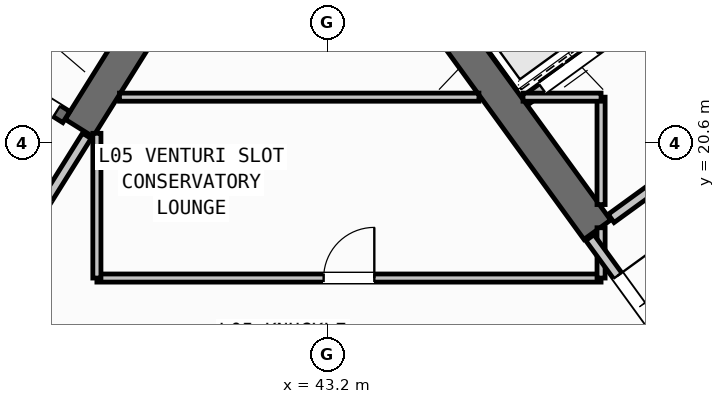
"""IFC4 building model, lengths in metres.
Left out: names, types, materials, properties, quantities, classifications, styles, units other than length and angle.
Written with IfcOpenShell. Run it as: python <this file> out.ifc"""

import sys

from ifc_helpers import new_model, si_unit, direction, frame, frame_2d, origin, place, context, subcontext, project, spatial, rectangle, extrude, source, transform, mapped, element, fill, save


model = new_model("IFC4")
c1 = context("Model", 3, precision=1e-05, world=origin(), true_north=direction((0.0, 1.0)))
c2 = subcontext(c1, "Body", "Model", "MODEL_VIEW")
j1 = project(units=[si_unit("LENGTHUNIT", "METRE"), si_unit("PLANEANGLEUNIT", "RADIAN")], contexts=[c1])
p1 = place(None, origin())
s1 = spatial("IfcSite", under=j1, at=p1, CompositionType="ELEMENT")
p2 = place(p1, origin())
s2 = spatial("IfcBuilding", under=s1, at=p2, CompositionType="ELEMENT")
p3 = place(p2, frame((0.0, 0.0, 24.0)))
s3 = spatial("IfcBuildingStorey", under=s2, at=p3, CompositionType="ELEMENT", Elevation=24.0)
p4 = place(p3, frame((40.168, 23.88, 0.0), z_axis=(0.0, 0.0, 1.0), x_axis=(-0.529893103397, -0.8480644427, 0.0)))
e1 = element("IfcWall", 1, at=p4, inside=s3, PredefinedType="SHEAR", context=c2, shape_type="SweptSolid", body=[
    extrude(rectangle(XDim=3.525, YDim=0.65, at=frame_2d((1.763, 0.0))), origin(), (0.0, 0.0, 1.0), 3.35),
])
p5 = place(p3, frame((48.526, 18.884, 0.0), z_axis=(0.0, 0.0, 1.0), x_axis=(-0.58777996584, 0.809020835181, 0.0)))
e2 = element("IfcWall", 2, at=p5, inside=s3, PredefinedType="SHEAR", context=c2, shape_type="SweptSolid", body=[
    extrude(rectangle(XDim=6.375, YDim=0.65, at=frame_2d((3.188, 0.0))), origin(), (0.0, 0.0, 1.0), 3.35),
])
p6 = place(p3, frame((38.046, 21.108, 0.0), z_axis=(0.0, 0.0, 1.0), x_axis=(-0.848054434086, 0.529909121291, 0.0)))
e3 = element("IfcWall", 3, at=p6, inside=s3, PredefinedType="SHEAR", context=c2, shape_type="SweptSolid", body=[
    extrude(rectangle(XDim=7.33, YDim=0.26, at=frame_2d((3.665, 0.0))), origin(), (0.0, 0.0, 1.0), 3.35),
])
p7 = place(p6, frame((0.22, 0.0, 0.0)))
e4 = element("IfcOpeningElement", 4, at=p7, cuts=e3, PredefinedType="OPENING", context=c2, shape_type="SweptSolid", body=[
    extrude(rectangle(XDim=1.1, YDim=2.1, at=frame_2d((0.55, 1.05))), frame((0.0, 0.14, 0.0), z_axis=(0.0, -1.0, 0.0), x_axis=(1.0, 0.0, 0.0)), (0.0, 0.0, 1.0), 0.28),
])
p8 = place(p3, frame((47.106, 21.437, 0.0), z_axis=(0.0, 0.0, 1.0), x_axis=(0.809012514015, 0.58779141893, 0.0)))
e5 = element("IfcWall", 5, at=p8, inside=s3, PredefinedType="STANDARD", context=c2, shape_type="SweptSolid", body=[
    extrude(rectangle(XDim=3.398, YDim=0.2, at=frame_2d((1.699, 0.0))), origin(), (0.0, 0.0, 1.0), 3.34),
])
p9 = place(p8, frame((0.408, 0.0, 0.0)))
e6 = element("IfcOpeningElement", 6, at=p9, cuts=e5, PredefinedType="OPENING", context=c2, shape_type="SweptSolid", body=[
    extrude(rectangle(XDim=1.3, YDim=2.2, at=frame_2d((0.65, 1.1))), frame((0.0, 0.11, 0.0), z_axis=(0.0, -1.0, 0.0), x_axis=(1.0, 0.0, 0.0)), (0.0, 0.0, 1.0), 0.22),
])
p10 = place(p3, frame((48.799, 19.107, 0.0), z_axis=(0.0, 0.0, 1.0), x_axis=(0.809012959416, 0.587790805897, 0.0)))
e7 = element("IfcWall", 7, at=p10, inside=s3, PredefinedType="STANDARD", context=c2, shape_type="SweptSolid", body=[
    extrude(rectangle(XDim=5.718, YDim=0.2, at=frame_2d((2.859, 0.0))), origin(), (0.0, 0.0, 1.0), 3.34),
])
p11 = place(p10, frame((2.498, 0.0, 0.0)))
e8 = element("IfcOpeningElement", 8, at=p11, cuts=e7, PredefinedType="OPENING", context=c2, shape_type="SweptSolid", body=[
    extrude(rectangle(XDim=1.15, YDim=2.1, at=frame_2d((0.575, 1.05))), frame((0.0, 0.11, 0.0), z_axis=(0.0, -1.0, 0.0), x_axis=(1.0, 0.0, 0.0)), (0.0, 0.0, 1.0), 0.22),
])
p12 = place(p3, frame((38.451, 20.737, 0.0), z_axis=(0.0, 0.0, 1.0), x_axis=(-0.529924799939, -0.848044637038, 0.0)))
e9 = element("IfcWall", 9, at=p12, inside=s3, PredefinedType="STANDARD", context=c2, shape_type="SweptSolid", body=[
    extrude(rectangle(XDim=2.96, YDim=0.2, at=frame_2d((1.48, 0.0))), origin(), (0.0, 0.0, 1.0), 3.34),
])
p13 = place(p12, frame((1.46, 0.0, 0.0)))
e10 = element("IfcOpeningElement", 10, at=p13, cuts=e9, PredefinedType="OPENING", context=c2, shape_type="SweptSolid", body=[
    extrude(rectangle(XDim=0.86, YDim=2.05, at=frame_2d((0.43, 1.025))), frame((0.0, 0.11, 0.0), z_axis=(0.0, -1.0, 0.0), x_axis=(1.0, 0.0, 0.0)), (0.0, 0.0, 1.0), 0.22),
])
p14 = place(p3, frame((38.65, 17.93, 0.0), z_axis=(0.0, 0.0, 1.0), x_axis=(1.0, 0.0, 0.0)))
e11 = element("IfcWall", 11, at=p14, inside=s3, PredefinedType="PARTITIONING", context=c2, shape_type="SweptSolid", body=[
    extrude(rectangle(XDim=9.95, YDim=0.16, at=frame_2d((4.975, 0.0))), origin(), (0.0, 0.0, 1.0), 3.34),
])
p15 = place(p14, frame((4.475, 0.0, 0.0)))
e12 = element("IfcOpeningElement", 12, at=p15, cuts=e11, PredefinedType="OPENING", context=c2, shape_type="SweptSolid", body=[
    extrude(rectangle(XDim=1.0, YDim=2.1, at=frame_2d((0.5, 1.05))), frame((0.0, 0.09, 0.0), z_axis=(0.0, -1.0, 0.0), x_axis=(1.0, 0.0, 0.0)), (0.0, 0.0, 1.0), 0.18),
])
p16 = place(p3, frame((38.65, 17.93, 0.0), z_axis=(0.0, 0.0, 1.0), x_axis=(0.0, 1.0, 0.0)))
e13 = element("IfcWall", 13, at=p16, inside=s3, PredefinedType="PARTITIONING", context=c2, shape_type="SweptSolid", body=[
    extrude(rectangle(XDim=2.857, YDim=0.16, at=frame_2d((1.428, 0.0))), origin(), (0.0, 0.0, 1.0), 3.34),
])
p17 = place(p3, frame((48.6, 17.93, 0.0), z_axis=(0.0, 0.0, 1.0), x_axis=(0.0, 1.0, 0.0)))
e14 = element("IfcWall", 14, at=p17, inside=s3, PredefinedType="PARTITIONING", context=c2, shape_type="SweptSolid", body=[
    extrude(rectangle(XDim=0.993, YDim=0.16, at=frame_2d((0.496, 0.0))), origin(), (0.0, 0.0, 1.0), 3.34),
])
p18 = place(p3, frame((48.6, 19.38, 0.0), z_axis=(0.0, 0.0, 1.0), x_axis=(0.0, 1.0, 0.0)))
e15 = element("IfcWall", 15, at=p18, inside=s3, PredefinedType="PARTITIONING", context=c2, shape_type="SweptSolid", body=[
    extrude(rectangle(XDim=2.12, YDim=0.16, at=frame_2d((1.06, 0.0))), origin(), (0.0, 0.0, 1.0), 3.34),
])
p19 = place(p3, frame((39.095, 21.5, 0.0), z_axis=(0.0, 0.0, 1.0), x_axis=(1.0, 0.0, 0.0)))
e16 = element("IfcWall", 16, at=p19, inside=s3, PredefinedType="PARTITIONING", context=c2, shape_type="SweptSolid", body=[
    extrude(rectangle(XDim=7.094, YDim=0.16, at=frame_2d((3.547, 0.0))), origin(), (0.0, 0.0, 1.0), 3.34),
])
p20 = place(p3, frame((47.06, 21.5, 0.0), z_axis=(0.0, 0.0, 1.0), x_axis=(1.0, 0.0, 0.0)))
e17 = element("IfcWall", 17, at=p20, inside=s3, PredefinedType="PARTITIONING", context=c2, shape_type="SweptSolid", body=[
    extrude(rectangle(XDim=1.54, YDim=0.16, at=frame_2d((0.77, 0.0))), origin(), (0.0, 0.0, 1.0), 3.34),
])
p21 = place(p3, frame((50.119, 16.333, 0.0), z_axis=(0.0, 0.0, 1.0), x_axis=(-0.587749856981, 0.809042709391, 0.0)))
e18 = element("IfcWall", 18, at=p21, inside=s3, PredefinedType="STANDARD", context=c2, shape_type="SweptSolid", body=[
    extrude(rectangle(XDim=2.96, YDim=0.2, at=frame_2d((1.48, 0.0))), origin(), (0.0, 0.0, 1.0), 3.34),
])
p22 = place(p21, frame((0.53, 0.0, 0.0)))
e19 = element("IfcOpeningElement", 19, at=p22, cuts=e18, PredefinedType="OPENING", context=c2, shape_type="SweptSolid", body=[
    extrude(rectangle(XDim=1.5, YDim=2.15, at=frame_2d((0.75, 1.075))), frame((0.0, 0.11, 0.0), z_axis=(0.0, -1.0, 0.0), x_axis=(1.0, 0.0, 0.0)), (0.0, 0.0, 1.0), 0.22),
])
m1 = source(origin(), c2, "Body", "SweptSolid", [
    extrude(rectangle(XDim=1.1, YDim=2.1, at=frame_2d((0.55, 1.05))), frame((0.0, 0.025, 0.0), z_axis=(0.0, -1.0, 0.0), x_axis=(1.0, 0.0, 0.0)), (0.0, 0.0, 1.0), 0.05),
])
p23 = place(p7, origin())
e20 = element("IfcDoor", 20, at=p23, inside=s3, OperationType="SINGLE_SWING_RIGHT", PredefinedType="DOOR", context=c2, shape_type="MappedRepresentation", body=[
    mapped(m1, transform((0.0, 0.0, 0.0), scale=1.0)),
])
fill(e4, e20)
m2 = source(origin(), c2, "Body", "SweptSolid", [
    extrude(rectangle(XDim=1.3, YDim=2.2, at=frame_2d((0.65, 1.1))), frame((0.0, 0.025, 0.0), z_axis=(0.0, -1.0, 0.0), x_axis=(1.0, 0.0, 0.0)), (0.0, 0.0, 1.0), 0.05),
])
p24 = place(p9, origin())
e21 = element("IfcDoor", 21, at=p24, inside=s3, OperationType="DOUBLE_DOOR_SLIDING", PredefinedType="DOOR", context=c2, shape_type="MappedRepresentation", body=[
    mapped(m2, transform((0.0, 0.0, 0.0), scale=1.0)),
])
fill(e6, e21)
m3 = source(origin(), c2, "Body", "SweptSolid", [
    extrude(rectangle(XDim=1.0, YDim=2.1, at=frame_2d((0.5, 1.05))), frame((0.0, 0.025, 0.0), z_axis=(0.0, -1.0, 0.0), x_axis=(1.0, 0.0, 0.0)), (0.0, 0.0, 1.0), 0.05),
])
p25 = place(p15, origin())
e22 = element("IfcDoor", 22, at=p25, inside=s3, OperationType="SINGLE_SWING_RIGHT", PredefinedType="DOOR", context=c2, shape_type="MappedRepresentation", body=[
    mapped(m3, transform((0.0, 0.0, 0.0), scale=1.0)),
])
fill(e12, e22)
m4 = source(origin(), c2, "Body", "SweptSolid", [
    extrude(rectangle(XDim=1.5, YDim=2.15, at=frame_2d((0.75, 1.075))), frame((0.0, 0.025, 0.0), z_axis=(0.0, -1.0, 0.0), x_axis=(1.0, 0.0, 0.0)), (0.0, 0.0, 1.0), 0.05),
])
p26 = place(p22, frame((1.5, 0.0, 0.0), z_axis=(0.0, 0.0, 1.0), x_axis=(-1.0, 0.0, 0.0)))
e23 = element("IfcDoor", 23, at=p26, inside=s3, OperationType="DOUBLE_DOOR_SINGLE_SWING", PredefinedType="DOOR", context=c2, shape_type="MappedRepresentation", body=[
    mapped(m4, transform((0.0, 0.0, 0.0), scale=1.0)),
])
fill(e19, e23)
save(model, sys.argv[1])
